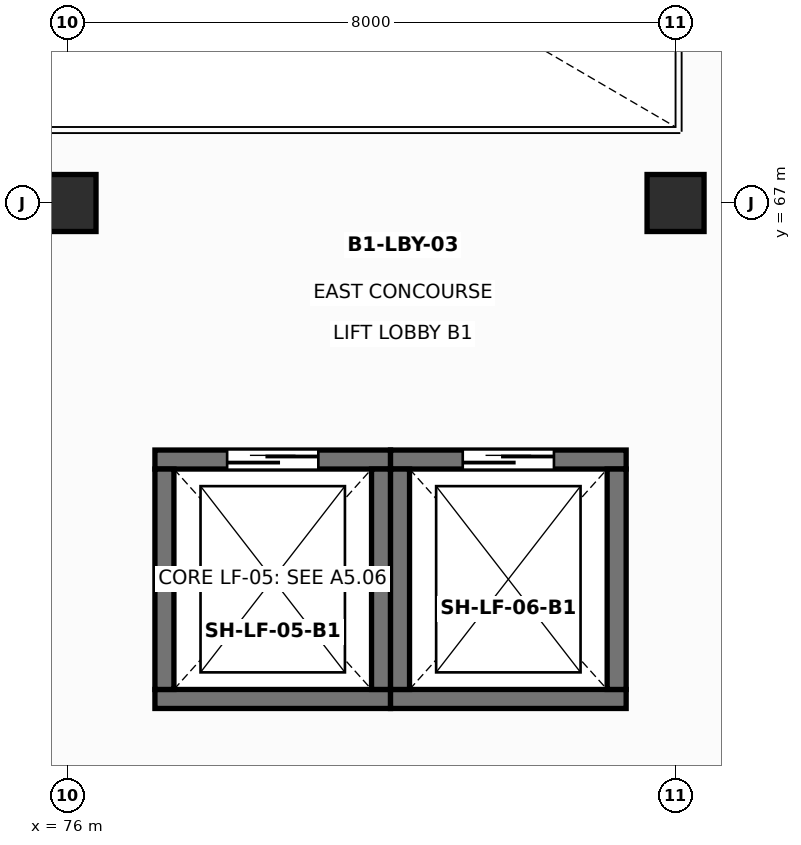
"""IFC4 building model, lengths in metres.
Left out: names, types, materials, properties, quantities, classifications, styles, units other than length and angle.
Written with IfcOpenShell. Run it as: python <this file> out.ifc"""

import sys

from ifc_helpers import new_model, si_unit, direction, frame, frame_2d, origin, origin_2d, place, context, subcontext, project, spatial, rectangle, extrude, element, fill, save


model = new_model("IFC4")
c1 = context("Model", 3, precision=1e-05, world=origin(), true_north=direction((0.0, 1.0)))
c2 = subcontext(c1, "Body", "Model", "MODEL_VIEW")
j1 = project(units=[si_unit("LENGTHUNIT", "METRE"), si_unit("PLANEANGLEUNIT", "RADIAN")], contexts=[c1])
p1 = place(None, origin())
s1 = spatial("IfcSite", under=j1, at=p1, CompositionType="ELEMENT")
p2 = place(p1, origin())
s2 = spatial("IfcBuilding", under=s1, at=p2, CompositionType="ELEMENT")
p3 = place(p2, frame((0.0, 0.0, -5.6)))
s3 = spatial("IfcBuildingStorey", under=s2, at=p3, CompositionType="ELEMENT", Elevation=-5.6)
for number, where, z_axis, x_axis in (
    (1, (76.0, 67.0, 0.0), (0.0, 0.0, 1.0), (1.0, 0.0, 0.0)),
    (2, (84.0, 67.0, 0.0), (0.0, 0.0, 1.0), (1.0, 0.0, 0.0)),
):
    element("IfcColumn", number, at=place(p3, frame(where, z_axis=z_axis, x_axis=x_axis)), inside=s3, PredefinedType="COLUMN", context=c2, shape_type="SweptSolid", body=[
        extrude(rectangle(XDim=0.75, YDim=0.75, at=origin_2d()), origin(), (0.0, 0.0, 1.0), 5.6),
    ])
p4 = place(p3, frame((77.15, 60.475, 0.0), z_axis=(0.0, 0.0, 1.0), x_axis=(1.0, 0.0, 0.0)))
e3 = element("IfcWall", 3, at=p4, inside=s3, PredefinedType="SOLIDWALL", context=c2, shape_type="SweptSolid", body=[
    extrude(rectangle(XDim=3.1, YDim=0.25, at=frame_2d((1.55, 0.0))), origin(), (0.0, 0.0, 1.0), 5.275),
])
p5 = place(p3, frame((80.25, 63.625, 0.0), z_axis=(0.0, 0.0, 1.0), x_axis=(-1.0, 0.0, 0.0)))
e4 = element("IfcWall", 4, at=p5, inside=s3, PredefinedType="SOLIDWALL", context=c2, shape_type="SweptSolid", body=[
    extrude(rectangle(XDim=3.1, YDim=0.25, at=frame_2d((1.55, 0.0))), origin(), (0.0, 0.0, 1.0), 5.275),
])
p6 = place(p5, frame((0.95, 0.0, 0.0)))
e5 = element("IfcOpeningElement", 5, at=p6, cuts=e4, PredefinedType="OPENING", context=c2, shape_type="SweptSolid", body=[
    extrude(rectangle(XDim=1.2, YDim=2.2, at=frame_2d((0.6, 1.1))), frame((0.0, 0.135, 0.0), z_axis=(0.0, -1.0, 0.0), x_axis=(1.0, 0.0, 0.0)), (0.0, 0.0, 1.0), 0.27),
])
for number, where, z_axis, x_axis in (
    (6, (80.125, 60.6, 0.0), (0.0, 0.0, 1.0), (0.0, 1.0, 0.0)),
    (7, (77.275, 63.5, 0.0), (0.0, 0.0, 1.0), (0.0, -1.0, 0.0)),
):
    element("IfcWall", number, at=place(p3, frame(where, z_axis=z_axis, x_axis=x_axis)), inside=s3, PredefinedType="SOLIDWALL", context=c2, shape_type="SweptSolid", body=[
        extrude(rectangle(XDim=2.9, YDim=0.25, at=frame_2d((1.45, 0.0))), origin(), (0.0, 0.0, 1.0), 5.275),
    ])
p7 = place(p3, frame((80.25, 60.475, 0.0), z_axis=(0.0, 0.0, 1.0), x_axis=(1.0, 0.0, 0.0)))
e8 = element("IfcWall", 8, at=p7, inside=s3, PredefinedType="SOLIDWALL", context=c2, shape_type="SweptSolid", body=[
    extrude(rectangle(XDim=3.1, YDim=0.25, at=frame_2d((1.55, 0.0))), origin(), (0.0, 0.0, 1.0), 5.275),
])
p8 = place(p3, frame((83.35, 63.625, 0.0), z_axis=(0.0, 0.0, 1.0), x_axis=(-1.0, 0.0, 0.0)))
e9 = element("IfcWall", 9, at=p8, inside=s3, PredefinedType="SOLIDWALL", context=c2, shape_type="SweptSolid", body=[
    extrude(rectangle(XDim=3.1, YDim=0.25, at=frame_2d((1.55, 0.0))), origin(), (0.0, 0.0, 1.0), 5.275),
])
p9 = place(p8, frame((0.95, 0.0, 0.0)))
e10 = element("IfcOpeningElement", 10, at=p9, cuts=e9, PredefinedType="OPENING", context=c2, shape_type="SweptSolid", body=[
    extrude(rectangle(XDim=1.2, YDim=2.2, at=frame_2d((0.6, 1.1))), frame((0.0, 0.135, 0.0), z_axis=(0.0, -1.0, 0.0), x_axis=(1.0, 0.0, 0.0)), (0.0, 0.0, 1.0), 0.27),
])
for number, where, z_axis, x_axis in (
    (11, (83.225, 60.6, 0.0), (0.0, 0.0, 1.0), (0.0, 1.0, 0.0)),
    (12, (80.375, 63.5, 0.0), (0.0, 0.0, 1.0), (0.0, -1.0, 0.0)),
):
    element("IfcWall", number, at=place(p3, frame(where, z_axis=z_axis, x_axis=x_axis)), inside=s3, PredefinedType="SOLIDWALL", context=c2, shape_type="SweptSolid", body=[
        extrude(rectangle(XDim=2.9, YDim=0.25, at=frame_2d((1.45, 0.0))), origin(), (0.0, 0.0, 1.0), 5.275),
    ])
p10 = place(p6, frame((1.2, 0.0, 0.0), z_axis=(0.0, 0.0, 1.0), x_axis=(-1.0, 0.0, 0.0)))
e13 = element("IfcDoor", 13, at=p10, inside=s3, OperationType="DOUBLE_DOOR_SLIDING", PredefinedType="DOOR", context=c2, shape_type="SweptSolid", body=[
    extrude(rectangle(XDim=1.2, YDim=2.2, at=frame_2d((0.6, 1.1))), frame((0.0, 0.025, 0.0), z_axis=(0.0, -1.0, 0.0), x_axis=(1.0, 0.0, 0.0)), (0.0, 0.0, 1.0), 0.05),
])
fill(e5, e13)
p11 = place(p9, frame((1.2, 0.0, 0.0), z_axis=(0.0, 0.0, 1.0), x_axis=(-1.0, 0.0, 0.0)))
e14 = element("IfcDoor", 14, at=p11, inside=s3, OperationType="DOUBLE_DOOR_SLIDING", PredefinedType="DOOR", context=c2, shape_type="SweptSolid", body=[
    extrude(rectangle(XDim=1.2, YDim=2.2, at=frame_2d((0.6, 1.1))), frame((0.0, 0.025, 0.0), z_axis=(0.0, -1.0, 0.0), x_axis=(1.0, 0.0, 0.0)), (0.0, 0.0, 1.0), 0.05),
])
fill(e10, e14)
save(model, sys.argv[1])
